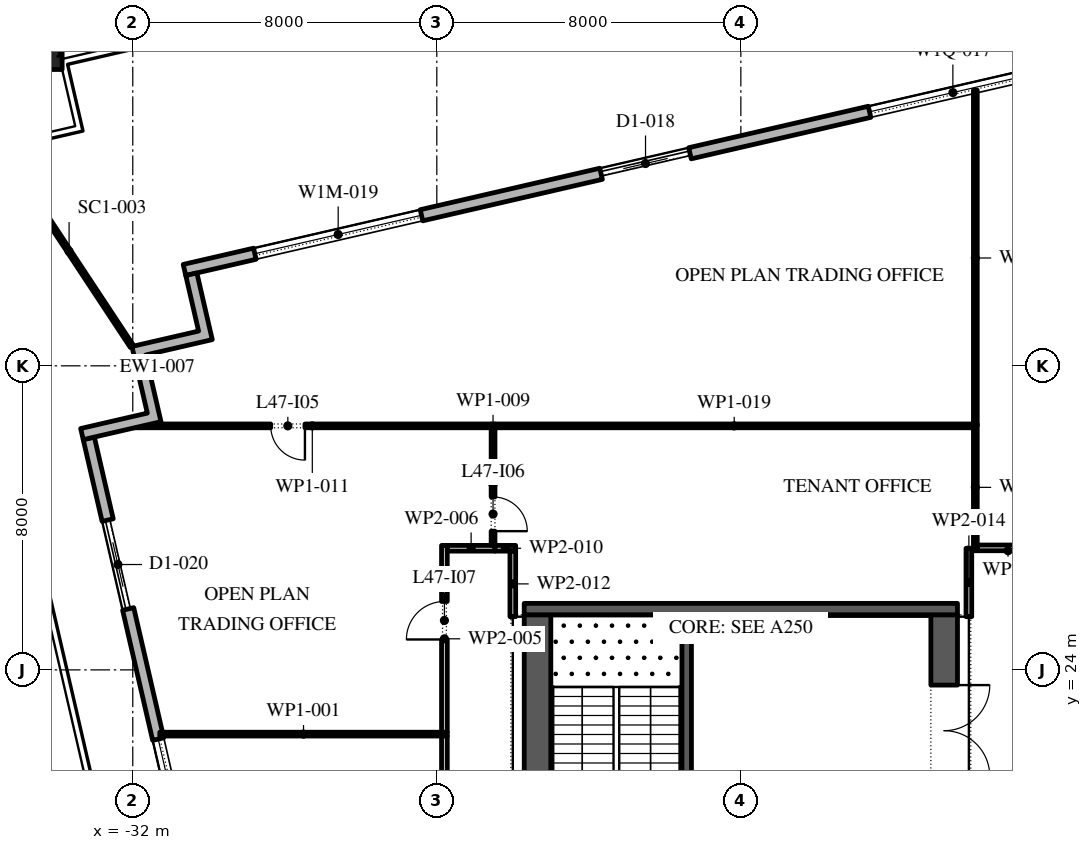
"""IFC4 building model, lengths in metres.
Left out: names, types, materials, properties, quantities, classifications, styles, units other than length and angle.
Written with IfcOpenShell. Run it as: python <this file> out.ifc"""

import sys

from ifc_helpers import new_model, si_unit, direction, frame, frame_2d, origin, origin_2d, place, context, subcontext, project, spatial, polyline, rectangle, outline, extrude, element, fill, save


model = new_model("IFC4")
c1 = context("Model", 3, precision=1e-05, world=origin(), true_north=direction((0.0, 1.0)))
c2 = subcontext(c1, "Body", "Model", "MODEL_VIEW")
j1 = project(units=[si_unit("LENGTHUNIT", "METRE"), si_unit("PLANEANGLEUNIT", "RADIAN")], contexts=[c1])
p1 = place(None, origin())
s1 = spatial("IfcSite", under=j1, at=p1, CompositionType="ELEMENT")
p2 = place(p1, origin())
s2 = spatial("IfcBuilding", under=s1, at=p2, CompositionType="ELEMENT")
p3 = place(p2, frame((0.0, 0.0, 213.6)))
s3 = spatial("IfcBuildingStorey", under=s2, at=p3, CompositionType="ELEMENT", Elevation=213.6)
p4 = place(p3, frame((-34.459, 40.397, 0.0), z_axis=(-0.018825755928, 0.08155896722, 0.996490705315), x_axis=(-0.974379530941, -0.22491004798, 0.0)))
e1 = element("IfcColumn", 1, at=p4, inside=s3, PredefinedType="COLUMN", context=c2, shape_type="SweptSolid", body=[
    extrude(rectangle(XDim=1.2, YDim=1.2, at=origin_2d()), origin(), (0.0, 0.0, 1.0), 4.215),
])
p5 = place(p3, frame((17.592, 45.657, 0.0), z_axis=(0.0, 0.0, 1.0), x_axis=(-0.974370243697, -0.224950279389, 0.0)))
e2 = element("IfcWall", 2, at=p5, inside=s3, PredefinedType="STANDARD", context=c2, shape_type="SweptSolid", body=[
    extrude(rectangle(XDim=49.5, YDim=0.3, at=frame_2d((24.75, 0.0))), origin(), (0.0, 0.0, 1.0), 4.0),
])
p6 = place(p5, frame((3.6, 0.0, 0.0)))
e3 = element("IfcOpeningElement", 3, at=p6, cuts=e2, PredefinedType="OPENING", context=c2, shape_type="SweptSolid", body=[
    extrude(rectangle(XDim=2.4, YDim=3.5, at=frame_2d((1.2, 1.75))), frame((0.0, 0.16, 0.0), z_axis=(0.0, -1.0, 0.0), x_axis=(1.0, 0.0, 0.0)), (0.0, 0.0, 1.0), 0.32),
])
p7 = place(p5, frame((9.9, 0.0, 0.45)))
e4 = element("IfcOpeningElement", 4, at=p7, cuts=e2, PredefinedType="OPENING", context=c2, shape_type="SweptSolid", body=[
    extrude(rectangle(XDim=4.5, YDim=2.45, at=frame_2d((2.25, 1.225))), frame((0.0, 0.16, 0.0), z_axis=(0.0, -1.0, 0.0), x_axis=(1.0, 0.0, 0.0)), (0.0, 0.0, 1.0), 0.32),
])
p8 = place(p5, frame((18.2, 0.0, 0.45)))
e5 = element("IfcOpeningElement", 5, at=p8, cuts=e2, PredefinedType="OPENING", context=c2, shape_type="SweptSolid", body=[
    extrude(rectangle(XDim=4.5, YDim=2.45, at=frame_2d((2.25, 1.225))), frame((0.0, 0.16, 0.0), z_axis=(0.0, -1.0, 0.0), x_axis=(1.0, 0.0, 0.0)), (0.0, 0.0, 1.0), 0.32),
])
p9 = place(p5, frame((26.5, 0.0, 0.45)))
e6 = element("IfcOpeningElement", 6, at=p9, cuts=e2, PredefinedType="OPENING", context=c2, shape_type="SweptSolid", body=[
    extrude(rectangle(XDim=4.5, YDim=2.45, at=frame_2d((2.25, 1.225))), frame((0.0, 0.16, 0.0), z_axis=(0.0, -1.0, 0.0), x_axis=(1.0, 0.0, 0.0)), (0.0, 0.0, 1.0), 0.32),
])
p10 = place(p5, frame((35.85, 0.0, 0.0)))
e7 = element("IfcOpeningElement", 7, at=p10, cuts=e2, PredefinedType="OPENING", context=c2, shape_type="SweptSolid", body=[
    extrude(rectangle(XDim=2.4, YDim=3.5, at=frame_2d((1.2, 1.75))), frame((0.0, 0.16, 0.0), z_axis=(0.0, -1.0, 0.0), x_axis=(1.0, 0.0, 0.0)), (0.0, 0.0, 1.0), 0.32),
])
p11 = place(p5, frame((43.1, 0.0, 0.45)))
e8 = element("IfcOpeningElement", 8, at=p11, cuts=e2, PredefinedType="OPENING", context=c2, shape_type="SweptSolid", body=[
    extrude(rectangle(XDim=4.5, YDim=2.575, at=frame_2d((2.25, 1.288))), frame((0.0, 0.16, 0.0), z_axis=(0.0, -1.0, 0.0), x_axis=(1.0, 0.0, 0.0)), (0.0, 0.0, 1.0), 0.32),
])
p12 = place(p3, frame((-33.157, 30.092, 0.0), z_axis=(0.0, 0.0, 1.0), x_axis=(0.224950279389, -0.974370243697, 0.0)))
e9 = element("IfcWall", 9, at=p12, inside=s3, PredefinedType="STANDARD", context=c2, shape_type="SweptSolid", body=[
    extrude(rectangle(XDim=49.5, YDim=0.3, at=frame_2d((24.75, 0.0))), origin(), (0.0, 0.0, 1.0), 4.0),
])
p13 = place(p12, frame((2.207, 0.0, 0.0)))
e10 = element("IfcOpeningElement", 10, at=p13, cuts=e9, PredefinedType="OPENING", context=c2, shape_type="SweptSolid", body=[
    extrude(rectangle(XDim=2.4, YDim=3.5, at=frame_2d((1.2, 1.75))), frame((0.0, 0.16, 0.0), z_axis=(0.0, -1.0, 0.0), x_axis=(1.0, 0.0, 0.0)), (0.0, 0.0, 1.0), 0.32),
])
p14 = place(p12, frame((8.121, 0.0, 0.45)))
e11 = element("IfcOpeningElement", 11, at=p14, cuts=e9, PredefinedType="OPENING", context=c2, shape_type="SweptSolid", body=[
    extrude(rectangle(XDim=4.5, YDim=2.825, at=frame_2d((2.25, 1.413))), frame((0.0, 0.16, 0.0), z_axis=(0.0, -1.0, 0.0), x_axis=(1.0, 0.0, 0.0)), (0.0, 0.0, 1.0), 0.32),
])
p15 = place(p12, frame((15.236, 0.0, 0.45)))
e12 = element("IfcOpeningElement", 12, at=p15, cuts=e9, PredefinedType="OPENING", context=c2, shape_type="SweptSolid", body=[
    extrude(rectangle(XDim=4.5, YDim=2.95, at=frame_2d((2.25, 1.475))), frame((0.0, 0.16, 0.0), z_axis=(0.0, -1.0, 0.0), x_axis=(1.0, 0.0, 0.0)), (0.0, 0.0, 1.0), 0.32),
])
p16 = place(p12, frame((22.35, 0.0, 0.45)))
e13 = element("IfcOpeningElement", 13, at=p16, cuts=e9, PredefinedType="OPENING", context=c2, shape_type="SweptSolid", body=[
    extrude(rectangle(XDim=4.5, YDim=3.0, at=frame_2d((2.25, 1.5))), frame((0.0, 0.16, 0.0), z_axis=(0.0, -1.0, 0.0), x_axis=(1.0, 0.0, 0.0)), (0.0, 0.0, 1.0), 0.32),
])
p17 = place(p12, frame((30.514, 0.0, 0.0)))
e14 = element("IfcOpeningElement", 14, at=p17, cuts=e9, PredefinedType="OPENING", context=c2, shape_type="SweptSolid", body=[
    extrude(rectangle(XDim=2.4, YDim=3.5, at=frame_2d((1.2, 1.75))), frame((0.0, 0.16, 0.0), z_axis=(0.0, -1.0, 0.0), x_axis=(1.0, 0.0, 0.0)), (0.0, 0.0, 1.0), 0.32),
])
p18 = place(p12, frame((36.579, 0.0, 0.45)))
e15 = element("IfcOpeningElement", 15, at=p18, cuts=e9, PredefinedType="OPENING", context=c2, shape_type="SweptSolid", body=[
    extrude(rectangle(XDim=4.5, YDim=3.05, at=frame_2d((2.25, 1.525))), frame((0.0, 0.16, 0.0), z_axis=(0.0, -1.0, 0.0), x_axis=(1.0, 0.0, 0.0)), (0.0, 0.0, 1.0), 0.32),
])
p19 = place(p12, frame((43.693, 0.0, 0.45)))
e16 = element("IfcOpeningElement", 16, at=p19, cuts=e9, PredefinedType="OPENING", context=c2, shape_type="SweptSolid", body=[
    extrude(rectangle(XDim=4.5, YDim=3.05, at=frame_2d((2.25, 1.525))), frame((0.0, 0.16, 0.0), z_axis=(0.0, -1.0, 0.0), x_axis=(1.0, 0.0, 0.0)), (0.0, 0.0, 1.0), 0.32),
])
p20 = place(p3, origin())
e17 = element("IfcWall", 17, at=p20, inside=s3, PredefinedType="STANDARD", context=c2, shape_type="SweptSolid", body=[
    extrude(outline(polyline([(-31.617, 30.756), (-32.022, 32.51), (-30.268, 32.914), (-30.605, 34.376), (-30.313, 34.443), (-29.908, 32.69), (-31.662, 32.285), (-31.257, 30.531), (-33.303, 30.058), (-33.371, 30.351), (-31.617, 30.756)])), origin(), (0.0, 0.0, 1.0), 4.0),
])
p21 = place(p3, frame((-32.022, 32.51, -0.05), z_axis=(0.0, 0.0, 1.0), x_axis=(-0.551323545156, 0.834291524922, 0.0)))
e18 = element("IfcWall", 18, at=p21, inside=s3, PredefinedType="STANDARD", context=c2, shape_type="SweptSolid", body=[
    extrude(rectangle(XDim=5.998, YDim=0.1, at=frame_2d((2.999, 0.0))), origin(), (0.0, 0.0, 1.0), 4.05),
])
p22 = place(p3, frame((-21.35, -2.45, 0.0), z_axis=(0.0, 0.0, 1.0), x_axis=(0.0, 1.0, 0.0)))
e19 = element("IfcWall", 19, at=p22, inside=s3, PredefinedType="SHEAR", context=c2, shape_type="SweptSolid", body=[
    extrude(rectangle(XDim=27.9, YDim=0.7, at=frame_2d((13.95, 0.0))), origin(), (0.0, 0.0, 1.0), 4.0),
])
p23 = place(p22, frame((5.05, 0.0, 0.0)))
e20 = element("IfcOpeningElement", 20, at=p23, cuts=e19, PredefinedType="OPENING", context=c2, shape_type="SweptSolid", body=[
    extrude(rectangle(XDim=1.2, YDim=2.1, at=frame_2d((0.6, 1.05))), frame((0.0, 0.36, 0.0), z_axis=(0.0, -1.0, 0.0), x_axis=(1.0, 0.0, 0.0)), (0.0, 0.0, 1.0), 0.72),
])
p24 = place(p22, frame((21.65, 0.0, 0.0)))
e21 = element("IfcOpeningElement", 21, at=p24, cuts=e19, PredefinedType="OPENING", context=c2, shape_type="SweptSolid", body=[
    extrude(rectangle(XDim=1.2, YDim=2.1, at=frame_2d((0.6, 1.05))), frame((0.0, 0.36, 0.0), z_axis=(0.0, -1.0, 0.0), x_axis=(1.0, 0.0, 0.0)), (0.0, 0.0, 1.0), 0.72),
])
p25 = place(p3, frame((-10.65, -2.45, 0.0), z_axis=(0.0, 0.0, 1.0), x_axis=(0.0, 1.0, 0.0)))
e22 = element("IfcWall", 22, at=p25, inside=s3, PredefinedType="SHEAR", context=c2, shape_type="SweptSolid", body=[
    extrude(rectangle(XDim=27.9, YDim=0.7, at=frame_2d((13.95, 0.0))), origin(), (0.0, 0.0, 1.0), 4.0),
])
p26 = place(p25, frame((23.65, 0.0, 0.0)))
e23 = element("IfcOpeningElement", 23, at=p26, cuts=e22, PredefinedType="OPENING", context=c2, shape_type="SweptSolid", body=[
    extrude(rectangle(XDim=2.4, YDim=2.1, at=frame_2d((1.2, 1.05))), frame((0.0, 0.36, 0.0), z_axis=(0.0, -1.0, 0.0), x_axis=(1.0, 0.0, 0.0)), (0.0, 0.0, 1.0), 0.72),
])
p27 = place(p25, frame((0.788, 0.0, 0.0)))
e24 = element("IfcOpeningElement", 24, at=p27, cuts=e22, PredefinedType="OPENING", context=c2, shape_type="SweptSolid", body=[
    extrude(rectangle(XDim=0.9, YDim=2.1, at=frame_2d((0.45, 1.05))), frame((0.0, 0.36, 0.0), z_axis=(0.0, -1.0, 0.0), x_axis=(1.0, 0.0, 0.0)), (0.0, 0.0, 1.0), 0.72),
])
p28 = place(p25, frame((3.962, 0.0, 0.0)))
e25 = element("IfcOpeningElement", 25, at=p28, cuts=e22, PredefinedType="OPENING", context=c2, shape_type="SweptSolid", body=[
    extrude(rectangle(XDim=1.0, YDim=2.1, at=frame_2d((0.5, 1.05))), frame((0.0, 0.36, 0.0), z_axis=(0.0, -1.0, 0.0), x_axis=(1.0, 0.0, 0.0)), (0.0, 0.0, 1.0), 0.72),
])
p29 = place(p3, frame((-21.7, 25.6, 0.0), z_axis=(0.0, 0.0, 1.0), x_axis=(1.0, 0.0, 0.0)))
e26 = element("IfcWall", 26, at=p29, inside=s3, PredefinedType="SHEAR", context=c2, shape_type="SweptSolid", body=[
    extrude(rectangle(XDim=11.4, YDim=0.3, at=frame_2d((5.7, 0.0))), origin(), (0.0, 0.0, 1.0), 4.0),
])
p30 = place(p3, frame((-17.425, 19.15, 0.0), z_axis=(0.0, 0.0, 1.0), x_axis=(0.0, 1.0, 0.0)))
e27 = element("IfcWall", 27, at=p30, inside=s3, PredefinedType="SHEAR", context=c2, shape_type="SweptSolid", body=[
    extrude(rectangle(XDim=6.3, YDim=0.25, at=frame_2d((3.15, 0.0))), origin(), (0.0, 0.0, 1.0), 4.0),
])
p31 = place(p30, frame((0.05, 0.0, 0.0)))
e28 = element("IfcOpeningElement", 28, at=p31, cuts=e27, PredefinedType="OPENING", context=c2, shape_type="SweptSolid", body=[
    extrude(rectangle(XDim=1.2, YDim=2.1, at=frame_2d((0.6, 1.05))), frame((0.0, 0.135, 0.0), z_axis=(0.0, -1.0, 0.0), x_axis=(1.0, 0.0, 0.0)), (0.0, 0.0, 1.0), 0.27),
])
p32 = place(p3, frame((-31.289, 22.31, 0.0), z_axis=(0.0, 0.0, 1.0), x_axis=(1.0, 0.0, 0.0)))
e29 = element("IfcWall", 29, at=p32, inside=s3, PredefinedType="PARTITIONING", context=c2, shape_type="SweptSolid", body=[
    extrude(rectangle(XDim=7.564, YDim=0.1, at=frame_2d((3.782, 0.0))), origin(), (0.0, 0.0, 1.0), 4.0),
])
p33 = place(p3, frame((-23.8, 8.45, 0.0), z_axis=(0.0, 0.0, 1.0), x_axis=(0.0, 1.0, 0.0)))
e30 = element("IfcWall", 30, at=p33, inside=s3, PredefinedType="PARTITIONING", context=c2, shape_type="SweptSolid", body=[
    extrude(rectangle(XDim=13.81, YDim=0.15, at=frame_2d((6.905, 0.0))), origin(), (0.0, 0.0, 1.0), 4.0),
])
p34 = place(p33, frame((6.46, 0.0, 0.0)))
e31 = element("IfcOpeningElement", 31, at=p34, cuts=e30, PredefinedType="OPENING", context=c2, shape_type="SweptSolid", body=[
    extrude(rectangle(XDim=1.0, YDim=2.1, at=frame_2d((0.5, 1.05))), frame((0.0, 0.085, 0.0), z_axis=(0.0, -1.0, 0.0), x_axis=(1.0, 0.0, 0.0)), (0.0, 0.0, 1.0), 0.17),
])
p35 = place(p3, frame((-23.8, 22.36, 0.0), z_axis=(0.0, 0.0, 1.0), x_axis=(0.0, 1.0, 0.0)))
e32 = element("IfcWall", 32, at=p35, inside=s3, PredefinedType="PARTITIONING", context=c2, shape_type="SweptSolid", body=[
    extrude(rectangle(XDim=4.915, YDim=0.15, at=frame_2d((2.458, 0.0))), origin(), (0.0, 0.0, 1.0), 4.0),
])
p36 = place(p35, frame((2.44, 0.0, 0.0)))
e33 = element("IfcOpeningElement", 33, at=p36, cuts=e32, PredefinedType="OPENING", context=c2, shape_type="SweptSolid", body=[
    extrude(rectangle(XDim=1.0, YDim=2.1, at=frame_2d((0.5, 1.05))), frame((0.0, 0.085, 0.0), z_axis=(0.0, -1.0, 0.0), x_axis=(1.0, 0.0, 0.0)), (0.0, 0.0, 1.0), 0.17),
])
p37 = place(p3, frame((-23.725, 27.2, 0.0), z_axis=(0.0, 0.0, 1.0), x_axis=(1.0, 0.0, 0.0)))
e34 = element("IfcWall", 34, at=p37, inside=s3, PredefinedType="PARTITIONING", context=c2, shape_type="SweptSolid", body=[
    extrude(rectangle(XDim=1.255, YDim=0.15, at=frame_2d((0.627, 0.0))), origin(), (0.0, 0.0, 1.0), 4.0),
])
p38 = place(p3, frame((-22.52, 27.275, 0.0), z_axis=(0.0, 0.0, 1.0), x_axis=(0.0, 1.0, 0.0)))
e35 = element("IfcWall", 35, at=p38, inside=s3, PredefinedType="PARTITIONING", context=c2, shape_type="SweptSolid", body=[
    extrude(rectangle(XDim=3.195, YDim=0.1, at=frame_2d((1.598, 0.0))), origin(), (0.0, 0.0, 1.0), 4.0),
])
p39 = place(p38, frame((0.375, 0.0, 0.0)))
e36 = element("IfcOpeningElement", 36, at=p39, cuts=e35, PredefinedType="OPENING", context=c2, shape_type="SweptSolid", body=[
    extrude(rectangle(XDim=0.9, YDim=2.1, at=frame_2d((0.45, 1.05))), frame((0.0, 0.06, 0.0), z_axis=(0.0, -1.0, 0.0), x_axis=(1.0, 0.0, 0.0)), (0.0, 0.0, 1.0), 0.12),
])
p40 = place(p3, frame((-22.47, 27.2, 0.0), z_axis=(0.0, 0.0, 1.0), x_axis=(1.0, 0.0, 0.0)))
e37 = element("IfcWall", 37, at=p40, inside=s3, PredefinedType="PARTITIONING", context=c2, shape_type="SweptSolid", body=[
    extrude(rectangle(XDim=0.545, YDim=0.15, at=frame_2d((0.272, 0.0))), origin(), (0.0, 0.0, 1.0), 4.0),
])
p41 = place(p3, frame((-22.57, 30.42, 0.0), z_axis=(0.0, 0.0, 1.0), x_axis=(-1.0, 0.0, 0.0)))
e38 = element("IfcWall", 38, at=p41, inside=s3, PredefinedType="PARTITIONING", context=c2, shape_type="SweptSolid", body=[
    extrude(rectangle(XDim=9.412, YDim=0.1, at=frame_2d((4.706, 0.0))), origin(), (0.0, 0.0, 1.0), 4.0),
])
p42 = place(p41, frame((4.9, 0.0, 0.0)))
e39 = element("IfcOpeningElement", 39, at=p42, cuts=e38, PredefinedType="OPENING", context=c2, shape_type="SweptSolid", body=[
    extrude(rectangle(XDim=0.9, YDim=2.1, at=frame_2d((0.45, 1.05))), frame((0.0, 0.06, 0.0), z_axis=(0.0, -1.0, 0.0), x_axis=(1.0, 0.0, 0.0)), (0.0, 0.0, 1.0), 0.12),
])
p43 = place(p3, frame((-22.0, 27.125, 0.0), z_axis=(0.0, 0.0, 1.0), x_axis=(0.0, -1.0, 0.0)))
e40 = element("IfcWall", 40, at=p43, inside=s3, PredefinedType="PARTITIONING", context=c2, shape_type="SweptSolid", body=[
    extrude(rectangle(XDim=1.725, YDim=0.15, at=frame_2d((0.863, 0.0))), origin(), (0.0, 0.0, 1.0), 4.0),
])
p44 = place(p3, frame((-10.0, 25.4, 0.0), z_axis=(0.0, 0.0, 1.0), x_axis=(0.0, 1.0, 0.0)))
e41 = element("IfcWall", 41, at=p44, inside=s3, PredefinedType="PARTITIONING", context=c2, shape_type="SweptSolid", body=[
    extrude(rectangle(XDim=1.8, YDim=0.15, at=frame_2d((0.9, 0.0))), origin(), (0.0, 0.0, 1.0), 4.0),
])
p45 = place(p3, frame((-9.83, 27.135, 0.0), z_axis=(0.0, 0.0, 1.0), x_axis=(0.0, 1.0, 0.0)))
e42 = element("IfcWall", 42, at=p45, inside=s3, PredefinedType="PARTITIONING", context=c2, shape_type="SweptSolid", body=[
    extrude(rectangle(XDim=3.335, YDim=0.1, at=frame_2d((1.667, 0.0))), origin(), (0.0, 0.0, 1.0), 4.0),
])
p46 = place(p3, frame((-9.78, 27.21, 0.0), z_axis=(0.0, 0.0, 1.0), x_axis=(1.0, 0.0, 0.0)))
e43 = element("IfcWall", 43, at=p46, inside=s3, PredefinedType="PARTITIONING", context=c2, shape_type="SweptSolid", body=[
    extrude(rectangle(XDim=1.62, YDim=0.15, at=frame_2d((0.81, 0.0))), origin(), (0.0, 0.0, 1.0), 4.0),
])
p47 = place(p3, frame((-9.88, 30.42, 0.0), z_axis=(0.0, 0.0, 1.0), x_axis=(-1.0, 0.0, 0.0)))
e44 = element("IfcWall", 44, at=p47, inside=s3, PredefinedType="PARTITIONING", context=c2, shape_type="SweptSolid", body=[
    extrude(rectangle(XDim=12.59, YDim=0.1, at=frame_2d((6.295, 0.0))), origin(), (0.0, 0.0, 1.0), 4.0),
])
p48 = place(p3, frame((-9.83, 30.42, 0.0), z_axis=(0.0, 0.0, 1.0), x_axis=(0.0, 1.0, 0.0)))
e45 = element("IfcWall", 45, at=p48, inside=s3, PredefinedType="PARTITIONING", context=c2, shape_type="SweptSolid", body=[
    extrude(rectangle(XDim=8.835, YDim=0.1, at=frame_2d((4.417, 0.0))), origin(), (0.0, 0.0, 1.0), 4.0),
])
p49 = place(p9, origin())
e46 = element("IfcWindow", 46, at=p49, inside=s3, PartitioningType="DOUBLE_PANEL_VERTICAL", PredefinedType="WINDOW", context=c2, shape_type="SweptSolid", body=[
    extrude(rectangle(XDim=4.5, YDim=2.45, at=frame_2d((2.25, 1.225))), frame((0.0, 0.03, 0.0), z_axis=(0.0, -1.0, 0.0), x_axis=(1.0, 0.0, 0.0)), (0.0, 0.0, 1.0), 0.06),
])
fill(e6, e46)
p50 = place(p10, origin())
e47 = element("IfcDoor", 47, at=p50, inside=s3, OperationType="DOUBLE_DOOR_SLIDING", PredefinedType="DOOR", context=c2, shape_type="SweptSolid", body=[
    extrude(rectangle(XDim=2.4, YDim=3.5, at=frame_2d((1.2, 1.75))), frame((0.0, 0.025, 0.0), z_axis=(0.0, -1.0, 0.0), x_axis=(1.0, 0.0, 0.0)), (0.0, 0.0, 1.0), 0.05),
])
fill(e7, e47)
p51 = place(p11, origin())
e48 = element("IfcWindow", 48, at=p51, inside=s3, PartitioningType="DOUBLE_PANEL_VERTICAL", PredefinedType="WINDOW", context=c2, shape_type="SweptSolid", body=[
    extrude(rectangle(XDim=4.5, YDim=2.575, at=frame_2d((2.25, 1.288))), frame((0.0, 0.03, 0.0), z_axis=(0.0, -1.0, 0.0), x_axis=(1.0, 0.0, 0.0)), (0.0, 0.0, 1.0), 0.06),
])
fill(e8, e48)
p52 = place(p13, origin())
e49 = element("IfcDoor", 49, at=p52, inside=s3, OperationType="DOUBLE_DOOR_SLIDING", PredefinedType="DOOR", context=c2, shape_type="SweptSolid", body=[
    extrude(rectangle(XDim=2.4, YDim=3.5, at=frame_2d((1.2, 1.75))), frame((0.0, 0.025, 0.0), z_axis=(0.0, -1.0, 0.0), x_axis=(1.0, 0.0, 0.0)), (0.0, 0.0, 1.0), 0.05),
])
fill(e10, e49)
p53 = place(p14, origin())
e50 = element("IfcWindow", 50, at=p53, inside=s3, PartitioningType="DOUBLE_PANEL_VERTICAL", PredefinedType="WINDOW", context=c2, shape_type="SweptSolid", body=[
    extrude(rectangle(XDim=4.5, YDim=2.825, at=frame_2d((2.25, 1.413))), frame((0.0, 0.03, 0.0), z_axis=(0.0, -1.0, 0.0), x_axis=(1.0, 0.0, 0.0)), (0.0, 0.0, 1.0), 0.06),
])
fill(e11, e50)
p54 = place(p26, frame((2.4, 0.0, 0.0), z_axis=(0.0, 0.0, 1.0), x_axis=(-1.0, 0.0, 0.0)))
e51 = element("IfcDoor", 51, at=p54, inside=s3, OperationType="DOUBLE_DOOR_SINGLE_SWING", PredefinedType="DOOR", context=c2, shape_type="SweptSolid", body=[
    extrude(rectangle(XDim=2.4, YDim=2.1, at=frame_2d((1.2, 1.05))), frame((0.0, 0.025, 0.0), z_axis=(0.0, -1.0, 0.0), x_axis=(1.0, 0.0, 0.0)), (0.0, 0.0, 1.0), 0.05),
])
fill(e23, e51)
p55 = place(p42, origin())
e52 = element("IfcDoor", 52, at=p55, inside=s3, OperationType="SINGLE_SWING_RIGHT", PredefinedType="DOOR", context=c2, shape_type="SweptSolid", body=[
    extrude(rectangle(XDim=0.9, YDim=2.1, at=frame_2d((0.45, 1.05))), frame((0.0, 0.025, 0.0), z_axis=(0.0, -1.0, 0.0), x_axis=(1.0, 0.0, 0.0)), (0.0, 0.0, 1.0), 0.05),
])
fill(e39, e52)
p56 = place(p39, frame((0.9, 0.0, 0.0), z_axis=(0.0, 0.0, 1.0), x_axis=(-1.0, 0.0, 0.0)))
e53 = element("IfcDoor", 53, at=p56, inside=s3, OperationType="SINGLE_SWING_LEFT", PredefinedType="DOOR", context=c2, shape_type="SweptSolid", body=[
    extrude(rectangle(XDim=0.9, YDim=2.1, at=frame_2d((0.45, 1.05))), frame((0.0, 0.025, 0.0), z_axis=(0.0, -1.0, 0.0), x_axis=(1.0, 0.0, 0.0)), (0.0, 0.0, 1.0), 0.05),
])
fill(e36, e53)
p57 = place(p36, origin())
e54 = element("IfcDoor", 54, at=p57, inside=s3, OperationType="SINGLE_SWING_RIGHT", PredefinedType="DOOR", context=c2, shape_type="SweptSolid", body=[
    extrude(rectangle(XDim=1.0, YDim=2.1, at=frame_2d((0.5, 1.05))), frame((0.0, 0.025, 0.0), z_axis=(0.0, -1.0, 0.0), x_axis=(1.0, 0.0, 0.0)), (0.0, 0.0, 1.0), 0.05),
])
fill(e33, e54)
save(model, sys.argv[1])
